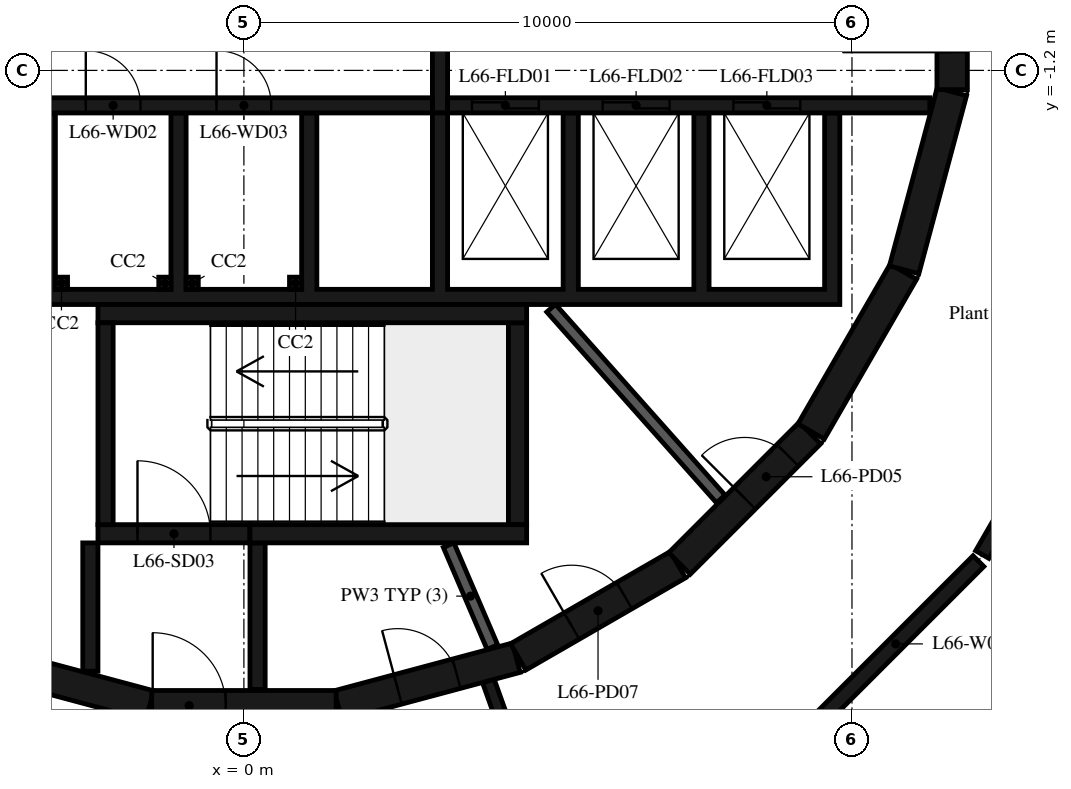
"""IFC4 building model, lengths in metres.
Left out: names, types, materials, properties, quantities, classifications, styles, units other than length and angle.
Written with IfcOpenShell. Run it as: python <this file> out.ifc"""

import sys

from ifc_helpers import new_model, si_unit, direction, frame, frame_2d, origin, origin_2d, place, context, subcontext, project, spatial, polyline, rectangle, outline, extrude, element, fill, save


model = new_model("IFC4")
c1 = context("Model", 3, precision=1e-05, world=origin(), true_north=direction((0.0, 1.0)))
c2 = subcontext(c1, "Body", "Model", "MODEL_VIEW")
j1 = project(units=[si_unit("LENGTHUNIT", "METRE"), si_unit("PLANEANGLEUNIT", "RADIAN")], contexts=[c1])
p1 = place(None, origin())
s1 = spatial("IfcSite", under=j1, at=p1, CompositionType="ELEMENT")
p2 = place(p1, origin())
s2 = spatial("IfcBuilding", under=s1, at=p2, CompositionType="ELEMENT")
p3 = place(p2, frame((0.0, 0.0, 258.2)))
s3 = spatial("IfcBuildingStorey", under=s2, at=p3, CompositionType="ELEMENT", Elevation=258.2)
for number, where, z_axis, x_axis in (
    (1, (-3.0, -4.7, 0.0), (0.0, 0.0, 1.0), (1.0, 0.0, 0.0)),
    (2, (-1.3, -4.7, 0.0), (0.0, 0.0, 1.0), (1.0, 0.0, 0.0)),
    (3, (-0.85, -4.7, 0.0), (0.0, 0.0, 1.0), (1.0, 0.0, 0.0)),
    (4, (0.85, -4.7, 0.0), (0.0, 0.0, 1.0), (1.0, 0.0, 0.0)),
):
    element("IfcColumn", number, at=place(p3, frame(where, z_axis=z_axis, x_axis=x_axis)), inside=s3, PredefinedType="COLUMN", context=c2, shape_type="SweptSolid", body=[
        extrude(rectangle(XDim=0.2, YDim=0.2, at=origin_2d()), origin(), (0.0, 0.0, 1.0), 3.1),
    ])
p4 = place(p3, frame((1.55, -11.643, 0.0), z_axis=(0.0, 0.0, 1.0), x_axis=(0.965948410781, 0.258734743916, 0.0)))
e5 = element("IfcWall", 5, at=p4, inside=s3, PredefinedType="SHEAR", context=c2, shape_type="SweptSolid", body=[
    extrude(rectangle(XDim=3.033, YDim=0.5, at=frame_2d((1.516, 0.0))), origin(), (0.0, 0.0, 1.0), 4.75),
])
p5 = place(p4, frame((1.016, 0.0, 0.0)))
e6 = element("IfcOpeningElement", 6, at=p5, cuts=e5, PredefinedType="OPENING", context=c2, shape_type="SweptSolid", body=[
    extrude(rectangle(XDim=1.0, YDim=2.4, at=frame_2d((0.5, 1.2))), frame((0.0, 0.26, 0.0), z_axis=(0.0, -1.0, 0.0), x_axis=(1.0, 0.0, 0.0)), (0.0, 0.0, 1.0), 0.52),
])
p6 = place(p3, frame((4.51, -10.845, 0.0), z_axis=(0.0, 0.0, 1.0), x_axis=(0.865975092491, 0.500087131594, 0.0)))
e7 = element("IfcWall", 7, at=p6, inside=s3, PredefinedType="SHEAR", context=c2, shape_type="SweptSolid", body=[
    extrude(rectangle(XDim=3.033, YDim=0.5, at=frame_2d((1.516, 0.0))), origin(), (0.0, 0.0, 1.0), 4.75),
])
p7 = place(p6, frame((1.016, 0.0, 0.0)))
e8 = element("IfcOpeningElement", 8, at=p7, cuts=e7, PredefinedType="OPENING", context=c2, shape_type="SweptSolid", body=[
    extrude(rectangle(XDim=1.0, YDim=2.4, at=frame_2d((0.5, 1.2))), frame((0.0, 0.26, 0.0), z_axis=(0.0, -1.0, 0.0), x_axis=(1.0, 0.0, 0.0)), (0.0, 0.0, 1.0), 0.52),
])
p8 = place(p3, frame((7.164, -9.308, 0.0), z_axis=(0.0, 0.0, 1.0), x_axis=(0.707106781187, 0.707106781187, 0.0)))
e9 = element("IfcWall", 9, at=p8, inside=s3, PredefinedType="SHEAR", context=c2, shape_type="SweptSolid", body=[
    extrude(rectangle(XDim=3.032, YDim=0.5, at=frame_2d((1.516, 0.0))), origin(), (0.0, 0.0, 1.0), 4.75),
])
p9 = place(p8, frame((1.516, 0.0, 0.0)))
e10 = element("IfcOpeningElement", 10, at=p9, cuts=e9, PredefinedType="OPENING", context=c2, shape_type="SweptSolid", body=[
    extrude(rectangle(XDim=1.0, YDim=2.4, at=frame_2d((0.5, 1.2))), frame((0.0, 0.26, 0.0), z_axis=(0.0, -1.0, 0.0), x_axis=(1.0, 0.0, 0.0)), (0.0, 0.0, 1.0), 0.52),
])
for number, where, z_axis, x_axis in (
    (11, (9.329, -7.137, 0.0), (0.0, 0.0, 1.0), (0.5, 0.866, 0.0)),
    (12, (10.858, -4.479, 0.0), (0.0, 0.0, 1.0), (0.259, 0.966, 0.0)),
):
    element("IfcWall", number, at=place(p3, frame(where, z_axis=z_axis, x_axis=x_axis)), inside=s3, PredefinedType="SHEAR", context=c2, shape_type="SweptSolid", body=[
        extrude(rectangle(XDim=3.033, YDim=0.5, at=frame_2d((1.516, 0.0))), origin(), (0.0, 0.0, 1.0), 4.75),
    ])
p10 = place(p3, frame((11.647, -1.516, 0.0), z_axis=(0.0, 0.0, 1.0), x_axis=(0.0, 1.0, 0.0)))
e13 = element("IfcWall", 13, at=p10, inside=s3, PredefinedType="SHEAR", context=c2, shape_type="SweptSolid", body=[
    extrude(rectangle(XDim=3.033, YDim=0.5, at=frame_2d((1.516, 0.0))), origin(), (0.0, 0.0, 1.0), 4.75),
])
p11 = place(p10, frame((0.616, 0.0, 0.0)))
e14 = element("IfcOpeningElement", 14, at=p11, cuts=e13, PredefinedType="OPENING", context=c2, shape_type="SweptSolid", body=[
    extrude(rectangle(XDim=1.8, YDim=2.1, at=frame_2d((0.9, 1.05))), frame((0.0, 0.26, 0.0), z_axis=(0.0, -1.0, 0.0), x_axis=(1.0, 0.0, 0.0)), (0.0, 0.0, 1.0), 0.52),
])
p12 = place(p3, frame((-4.479, -10.858, 0.0), z_axis=(0.0, 0.0, 1.0), x_axis=(0.965948410781, -0.258734743916, 0.0)))
e15 = element("IfcWall", 15, at=p12, inside=s3, PredefinedType="SHEAR", context=c2, shape_type="SweptSolid", body=[
    extrude(rectangle(XDim=3.033, YDim=0.5, at=frame_2d((1.516, 0.0))), origin(), (0.0, 0.0, 1.0), 4.75),
])
p13 = place(p3, frame((-1.516, -11.647, 0.0), z_axis=(0.0, 0.0, 1.0), x_axis=(1.0, 0.0, 0.0)))
e16 = element("IfcWall", 16, at=p13, inside=s3, PredefinedType="SHEAR", context=c2, shape_type="SweptSolid", body=[
    extrude(rectangle(XDim=3.033, YDim=0.5, at=frame_2d((1.516, 0.0))), origin(), (0.0, 0.0, 1.0), 4.75),
])
p14 = place(p13, frame((0.016, 0.0, 0.0)))
e17 = element("IfcOpeningElement", 17, at=p14, cuts=e16, PredefinedType="OPENING", context=c2, shape_type="SweptSolid", body=[
    extrude(rectangle(XDim=1.2, YDim=2.1, at=frame_2d((0.6, 1.05))), frame((0.0, 0.26, 0.0), z_axis=(0.0, -1.0, 0.0), x_axis=(1.0, 0.0, 0.0)), (0.0, 0.0, 1.0), 0.52),
])
p15 = place(p3, frame((-2.275, -8.67, 0.0), z_axis=(0.0, 0.0, 1.0), x_axis=(0.0, 1.0, 0.0)))
e18 = element("IfcWall", 18, at=p15, inside=s3, PredefinedType="SHEAR", context=c2, shape_type="SweptSolid", body=[
    extrude(rectangle(XDim=3.32, YDim=0.25, at=frame_2d((1.66, 0.0))), origin(), (0.0, 0.0, 1.0), 4.75),
])
p16 = place(p3, frame((-2.4, -5.2, 0.0), z_axis=(0.0, 0.0, 1.0), x_axis=(1.0, 0.0, 0.0)))
e19 = element("IfcWall", 19, at=p16, inside=s3, PredefinedType="SHEAR", context=c2, shape_type="SweptSolid", body=[
    extrude(rectangle(XDim=7.05, YDim=0.3, at=frame_2d((3.525, 0.0))), origin(), (0.0, 0.0, 1.0), 4.75),
])
p17 = place(p3, frame((4.5, -8.67, 0.0), z_axis=(0.0, 0.0, 1.0), x_axis=(0.0, 1.0, 0.0)))
e20 = element("IfcWall", 20, at=p17, inside=s3, PredefinedType="SHEAR", context=c2, shape_type="SweptSolid", body=[
    extrude(rectangle(XDim=3.32, YDim=0.3, at=frame_2d((1.66, 0.0))), origin(), (0.0, 0.0, 1.0), 4.75),
])
p18 = place(p3, frame((0.1, -8.82, 0.0), z_axis=(0.0, 0.0, 1.0), x_axis=(1.0, 0.0, 0.0)))
e21 = element("IfcWall", 21, at=p18, inside=s3, PredefinedType="SHEAR", context=c2, shape_type="SweptSolid", body=[
    extrude(rectangle(XDim=4.55, YDim=0.3, at=frame_2d((2.275, 0.0))), origin(), (0.0, 0.0, 1.0), 4.75),
])
p19 = place(p3, frame((-2.4, -8.82, 0.0), z_axis=(0.0, 0.0, 1.0), x_axis=(1.0, 0.0, 0.0)))
e22 = element("IfcWall", 22, at=p19, inside=s3, PredefinedType="SHEAR", context=c2, shape_type="SweptSolid", body=[
    extrude(rectangle(XDim=2.5, YDim=0.3, at=frame_2d((1.25, 0.0))), origin(), (0.0, 0.0, 1.0), 4.75),
])
p20 = place(p19, frame((0.65, 0.0, 0.0)))
e23 = element("IfcOpeningElement", 23, at=p20, cuts=e22, PredefinedType="OPENING", context=c2, shape_type="SweptSolid", body=[
    extrude(rectangle(XDim=1.2, YDim=2.1, at=frame_2d((0.6, 1.05))), frame((0.0, 0.16, 0.0), z_axis=(0.0, -1.0, 0.0), x_axis=(1.0, 0.0, 0.0)), (0.0, 0.0, 1.0), 0.32),
])
p21 = place(p3, frame((-2.525, -8.97, 0.0), z_axis=(0.0, 0.0, 1.0), x_axis=(0.0, -1.0, 0.0)))
e24 = element("IfcWall", 24, at=p21, inside=s3, PredefinedType="SHEAR", context=c2, shape_type="SweptSolid", body=[
    extrude(rectangle(XDim=2.11, YDim=0.25, at=frame_2d((1.055, 0.0))), origin(), (0.0, 0.0, 1.0), 4.75),
])
p22 = place(p3, frame((0.225, -8.97, 0.0), z_axis=(0.0, 0.0, 1.0), x_axis=(0.0, -1.0, 0.0)))
e25 = element("IfcWall", 25, at=p22, inside=s3, PredefinedType="SHEAR", context=c2, shape_type="SweptSolid", body=[
    extrude(rectangle(XDim=2.41, YDim=0.25, at=frame_2d((1.205, 0.0))), origin(), (0.0, 0.0, 1.0), 4.75),
])
p23 = place(p3, origin())
e26 = element("IfcWall", 26, at=p23, inside=s3, PredefinedType="SHEAR", context=c2, shape_type="SweptSolid", body=[
    extrude(outline(polyline([(9.8, -5.05), (9.8, -4.8), (9.8, -1.9), (9.55, -1.9), (9.55, -4.8), (7.65, -4.8), (7.65, -1.9), (7.4, -1.9), (7.4, -4.8), (5.5, -4.8), (5.5, -1.9), (5.25, -1.9), (5.25, -4.8), (3.35, -4.8), (3.35, -1.9), (3.1, -1.9), (3.1, -4.8), (1.2, -4.8), (1.2, -1.9), (0.95, -1.9), (0.95, -4.8), (-0.95, -4.8), (-0.95, -1.9), (-1.2, -1.9), (-1.2, -4.8), (-3.1, -4.8), (-3.1, -1.9), (-3.35, -1.9), (-3.35, -4.8), (-5.25, -4.8), (-5.25, -1.9), (-5.5, -1.9), (-5.5, -4.8), (-7.4, -4.8), (-7.4, -1.9), (-7.65, -1.9), (-7.65, -4.8), (-9.55, -4.8), (-9.55, -1.9), (-9.8, -1.9), (-9.8, -4.8), (-9.8, -5.05), (9.8, -5.05)])), origin(), (0.0, 0.0, 1.0), 4.75),
])
p24 = place(p3, frame((-11.28, -1.775, 0.0), z_axis=(0.0, 0.0, 1.0), x_axis=(1.0, 0.0, 0.0)))
e27 = element("IfcWall", 27, at=p24, inside=s3, PredefinedType="SHEAR", context=c2, shape_type="SweptSolid", body=[
    extrude(rectangle(XDim=14.38, YDim=0.25, at=frame_2d((7.19, 0.0))), origin(), (0.0, 0.0, 1.0), 4.75),
])
p25 = place(p24, frame((2.03, 0.0, 0.0)))
e28 = element("IfcOpeningElement", 28, at=p25, cuts=e27, PredefinedType="OPENING", context=c2, shape_type="SweptSolid", body=[
    extrude(rectangle(XDim=1.3, YDim=2.1, at=frame_2d((0.65, 1.05))), frame((0.0, 0.135, 0.0), z_axis=(0.0, -1.0, 0.0), x_axis=(1.0, 0.0, 0.0)), (0.0, 0.0, 1.0), 0.27),
])
p26 = place(p24, frame((4.18, 0.0, 0.0)))
e29 = element("IfcOpeningElement", 29, at=p26, cuts=e27, PredefinedType="OPENING", context=c2, shape_type="SweptSolid", body=[
    extrude(rectangle(XDim=1.3, YDim=2.1, at=frame_2d((0.65, 1.05))), frame((0.0, 0.135, 0.0), z_axis=(0.0, -1.0, 0.0), x_axis=(1.0, 0.0, 0.0)), (0.0, 0.0, 1.0), 0.27),
])
p27 = place(p24, frame((6.53, 0.0, 0.0)))
e30 = element("IfcOpeningElement", 30, at=p27, cuts=e27, PredefinedType="OPENING", context=c2, shape_type="SweptSolid", body=[
    extrude(rectangle(XDim=0.9, YDim=2.1, at=frame_2d((0.45, 1.05))), frame((0.0, 0.135, 0.0), z_axis=(0.0, -1.0, 0.0), x_axis=(1.0, 0.0, 0.0)), (0.0, 0.0, 1.0), 0.27),
])
p28 = place(p24, frame((8.68, 0.0, 0.0)))
e31 = element("IfcOpeningElement", 31, at=p28, cuts=e27, PredefinedType="OPENING", context=c2, shape_type="SweptSolid", body=[
    extrude(rectangle(XDim=0.9, YDim=2.1, at=frame_2d((0.45, 1.05))), frame((0.0, 0.135, 0.0), z_axis=(0.0, -1.0, 0.0), x_axis=(1.0, 0.0, 0.0)), (0.0, 0.0, 1.0), 0.27),
])
p29 = place(p24, frame((10.83, 0.0, 0.0)))
e32 = element("IfcOpeningElement", 32, at=p29, cuts=e27, PredefinedType="OPENING", context=c2, shape_type="SweptSolid", body=[
    extrude(rectangle(XDim=0.9, YDim=2.1, at=frame_2d((0.45, 1.05))), frame((0.0, 0.135, 0.0), z_axis=(0.0, -1.0, 0.0), x_axis=(1.0, 0.0, 0.0)), (0.0, 0.0, 1.0), 0.27),
])
p30 = place(p3, frame((3.35, -1.775, 0.0), z_axis=(0.0, 0.0, 1.0), x_axis=(1.0, 0.0, 0.0)))
e33 = element("IfcWall", 33, at=p30, inside=s3, PredefinedType="SHEAR", context=c2, shape_type="SweptSolid", body=[
    extrude(rectangle(XDim=7.93, YDim=0.25, at=frame_2d((3.965, 0.0))), origin(), (0.0, 0.0, 1.0), 4.75),
])
p31 = place(p30, frame((0.4, 0.0, 0.0)))
e34 = element("IfcOpeningElement", 34, at=p31, cuts=e33, PredefinedType="OPENING", context=c2, shape_type="SweptSolid", body=[
    extrude(rectangle(XDim=1.1, YDim=2.4, at=frame_2d((0.55, 1.2))), frame((0.0, 0.135, 0.0), z_axis=(0.0, -1.0, 0.0), x_axis=(1.0, 0.0, 0.0)), (0.0, 0.0, 1.0), 0.27),
])
p32 = place(p30, frame((2.55, 0.0, 0.0)))
e35 = element("IfcOpeningElement", 35, at=p32, cuts=e33, PredefinedType="OPENING", context=c2, shape_type="SweptSolid", body=[
    extrude(rectangle(XDim=1.1, YDim=2.4, at=frame_2d((0.55, 1.2))), frame((0.0, 0.135, 0.0), z_axis=(0.0, -1.0, 0.0), x_axis=(1.0, 0.0, 0.0)), (0.0, 0.0, 1.0), 0.27),
])
p33 = place(p30, frame((4.7, 0.0, 0.0)))
e36 = element("IfcOpeningElement", 36, at=p33, cuts=e33, PredefinedType="OPENING", context=c2, shape_type="SweptSolid", body=[
    extrude(rectangle(XDim=1.1, YDim=2.4, at=frame_2d((0.55, 1.2))), frame((0.0, 0.135, 0.0), z_axis=(0.0, -1.0, 0.0), x_axis=(1.0, 0.0, 0.0)), (0.0, 0.0, 1.0), 0.27),
])
p34 = place(p3, frame((3.225, -1.9, 0.0), z_axis=(0.0, 0.0, 1.0), x_axis=(0.0, 1.0, 0.0)))
e37 = element("IfcWall", 37, at=p34, inside=s3, PredefinedType="SHEAR", context=c2, shape_type="SweptSolid", body=[
    extrude(rectangle(XDim=3.8, YDim=0.25, at=frame_2d((1.9, 0.0))), origin(), (0.0, 0.0, 1.0), 4.75),
])
p35 = place(p3, frame((7.842, -8.248, 0.0), z_axis=(0.0, 0.0, 1.0), x_axis=(-0.66446128181, 0.747322691329, 0.0)))
e38 = element("IfcWall", 38, at=p35, inside=s3, PredefinedType="PARTITIONING", context=c2, shape_type="SweptSolid", body=[
    extrude(rectangle(XDim=4.198, YDim=0.19, at=frame_2d((2.099, 0.0))), origin(), (0.0, 0.0, 1.0), 4.75),
])
p36 = place(p3, frame((3.367, -9.007, 0.0), z_axis=(0.0, 0.0, 1.0), x_axis=(0.394387482265, -0.918944238696, 0.0)))
e39 = element("IfcWall", 39, at=p36, inside=s3, PredefinedType="PARTITIONING", context=c2, shape_type="SweptSolid", body=[
    extrude(rectangle(XDim=1.825, YDim=0.19, at=frame_2d((0.913, 0.0))), origin(), (0.0, 0.0, 1.0), 4.75),
])
p37 = place(p3, frame((4.02, -11.24, 0.0), z_axis=(0.0, 0.0, 1.0), x_axis=(0.336751058688, -0.941593715183, 0.0)))
e40 = element("IfcWall", 40, at=p37, inside=s3, PredefinedType="PARTITIONING", context=c2, shape_type="SweptSolid", body=[
    extrude(rectangle(XDim=3.207, YDim=0.2, at=frame_2d((1.604, 0.0))), origin(), (0.0, 0.0, 1.0), 4.75),
])
p38 = place(p37, frame((1.004, 0.0, 0.0)))
e41 = element("IfcOpeningElement", 41, at=p38, cuts=e40, PredefinedType="OPENING", context=c2, shape_type="SweptSolid", body=[
    extrude(rectangle(XDim=1.2, YDim=2.1, at=frame_2d((0.6, 1.05))), frame((0.0, 0.11, 0.0), z_axis=(0.0, -1.0, 0.0), x_axis=(1.0, 0.0, 0.0)), (0.0, 0.0, 1.0), 0.22),
])
p39 = place(p3, frame((9.358, -11.992, 0.0), z_axis=(0.0, 0.0, 1.0), x_axis=(0.707106781187, 0.707106781187, 0.0)))
e42 = element("IfcWall", 42, at=p39, inside=s3, PredefinedType="PARTITIONING", context=c2, shape_type="SweptSolid", body=[
    extrude(rectangle(XDim=3.849, YDim=0.25, at=frame_2d((1.925, 0.0))), origin(), (0.0, 0.0, 1.0), 4.75),
])
p40 = place(p3, frame((12.142, -9.162, 0.0), z_axis=(0.0, 0.0, 1.0), x_axis=(0.499717688814, 0.866188334882, 0.0)))
e43 = element("IfcWall", 43, at=p40, inside=s3, PredefinedType="PARTITIONING", context=c2, shape_type="SweptSolid", body=[
    extrude(rectangle(XDim=2.957, YDim=0.25, at=frame_2d((1.479, 0.0))), origin(), (0.0, 0.0, 1.0), 4.75),
])
p41 = place(p20, origin())
e44 = element("IfcDoor", 44, at=p41, inside=s3, OperationType="SINGLE_SWING_LEFT", PredefinedType="DOOR", context=c2, shape_type="SweptSolid", body=[
    extrude(rectangle(XDim=1.2, YDim=2.1, at=frame_2d((0.6, 1.05))), frame((0.0, 0.025, 0.0), z_axis=(0.0, -1.0, 0.0), x_axis=(1.0, 0.0, 0.0)), (0.0, 0.0, 1.0), 0.05),
])
fill(e23, e44)
p42 = place(p14, origin())
e45 = element("IfcDoor", 45, at=p42, inside=s3, OperationType="SINGLE_SWING_RIGHT", PredefinedType="DOOR", context=c2, shape_type="SweptSolid", body=[
    extrude(rectangle(XDim=1.2, YDim=2.1, at=frame_2d((0.6, 1.05))), frame((0.0, 0.025, 0.0), z_axis=(0.0, -1.0, 0.0), x_axis=(1.0, 0.0, 0.0)), (0.0, 0.0, 1.0), 0.05),
])
fill(e17, e45)
p43 = place(p11, origin())
e46 = element("IfcDoor", 46, at=p43, inside=s3, OperationType="DOUBLE_DOOR_SINGLE_SWING", PredefinedType="DOOR", context=c2, shape_type="SweptSolid", body=[
    extrude(rectangle(XDim=1.8, YDim=2.1, at=frame_2d((0.9, 1.05))), frame((0.0, 0.025, 0.0), z_axis=(0.0, -1.0, 0.0), x_axis=(1.0, 0.0, 0.0)), (0.0, 0.0, 1.0), 0.05),
])
fill(e14, e46)
p44 = place(p31, origin())
e47 = element("IfcDoor", 47, at=p44, inside=s3, OperationType="DOUBLE_DOOR_SLIDING", PredefinedType="DOOR", context=c2, shape_type="SweptSolid", body=[
    extrude(rectangle(XDim=1.1, YDim=2.4, at=frame_2d((0.55, 1.2))), frame((0.0, 0.025, 0.0), z_axis=(0.0, -1.0, 0.0), x_axis=(1.0, 0.0, 0.0)), (0.0, 0.0, 1.0), 0.05),
])
fill(e34, e47)
p45 = place(p32, origin())
e48 = element("IfcDoor", 48, at=p45, inside=s3, OperationType="DOUBLE_DOOR_SLIDING", PredefinedType="DOOR", context=c2, shape_type="SweptSolid", body=[
    extrude(rectangle(XDim=1.1, YDim=2.4, at=frame_2d((0.55, 1.2))), frame((0.0, 0.025, 0.0), z_axis=(0.0, -1.0, 0.0), x_axis=(1.0, 0.0, 0.0)), (0.0, 0.0, 1.0), 0.05),
])
fill(e35, e48)
p46 = place(p33, origin())
e49 = element("IfcDoor", 49, at=p46, inside=s3, OperationType="DOUBLE_DOOR_SLIDING", PredefinedType="DOOR", context=c2, shape_type="SweptSolid", body=[
    extrude(rectangle(XDim=1.1, YDim=2.4, at=frame_2d((0.55, 1.2))), frame((0.0, 0.025, 0.0), z_axis=(0.0, -1.0, 0.0), x_axis=(1.0, 0.0, 0.0)), (0.0, 0.0, 1.0), 0.05),
])
fill(e36, e49)
p47 = place(p28, origin())
e50 = element("IfcDoor", 50, at=p47, inside=s3, OperationType="SINGLE_SWING_RIGHT", PredefinedType="DOOR", context=c2, shape_type="SweptSolid", body=[
    extrude(rectangle(XDim=0.9, YDim=2.1, at=frame_2d((0.45, 1.05))), frame((0.0, 0.025, 0.0), z_axis=(0.0, -1.0, 0.0), x_axis=(1.0, 0.0, 0.0)), (0.0, 0.0, 1.0), 0.05),
])
fill(e31, e50)
p48 = place(p29, origin())
e51 = element("IfcDoor", 51, at=p48, inside=s3, OperationType="SINGLE_SWING_LEFT", PredefinedType="DOOR", context=c2, shape_type="SweptSolid", body=[
    extrude(rectangle(XDim=0.9, YDim=2.1, at=frame_2d((0.45, 1.05))), frame((0.0, 0.025, 0.0), z_axis=(0.0, -1.0, 0.0), x_axis=(1.0, 0.0, 0.0)), (0.0, 0.0, 1.0), 0.05),
])
fill(e32, e51)
p49 = place(p9, origin())
e52 = element("IfcDoor", 52, at=p49, inside=s3, OperationType="SINGLE_SWING_LEFT", PredefinedType="DOOR", context=c2, shape_type="SweptSolid", body=[
    extrude(rectangle(XDim=1.0, YDim=2.4, at=frame_2d((0.5, 1.2))), frame((0.0, 0.025, 0.0), z_axis=(0.0, -1.0, 0.0), x_axis=(1.0, 0.0, 0.0)), (0.0, 0.0, 1.0), 0.05),
])
fill(e10, e52)
p50 = place(p5, origin())
e53 = element("IfcDoor", 53, at=p50, inside=s3, OperationType="SINGLE_SWING_RIGHT", PredefinedType="DOOR", context=c2, shape_type="SweptSolid", body=[
    extrude(rectangle(XDim=1.0, YDim=2.4, at=frame_2d((0.5, 1.2))), frame((0.0, 0.025, 0.0), z_axis=(0.0, -1.0, 0.0), x_axis=(1.0, 0.0, 0.0)), (0.0, 0.0, 1.0), 0.05),
])
fill(e6, e53)
p51 = place(p7, origin())
e54 = element("IfcDoor", 54, at=p51, inside=s3, OperationType="SINGLE_SWING_LEFT", PredefinedType="DOOR", context=c2, shape_type="SweptSolid", body=[
    extrude(rectangle(XDim=1.0, YDim=2.4, at=frame_2d((0.5, 1.2))), frame((0.0, 0.025, 0.0), z_axis=(0.0, -1.0, 0.0), x_axis=(1.0, 0.0, 0.0)), (0.0, 0.0, 1.0), 0.05),
])
fill(e8, e54)
save(model, sys.argv[1])
